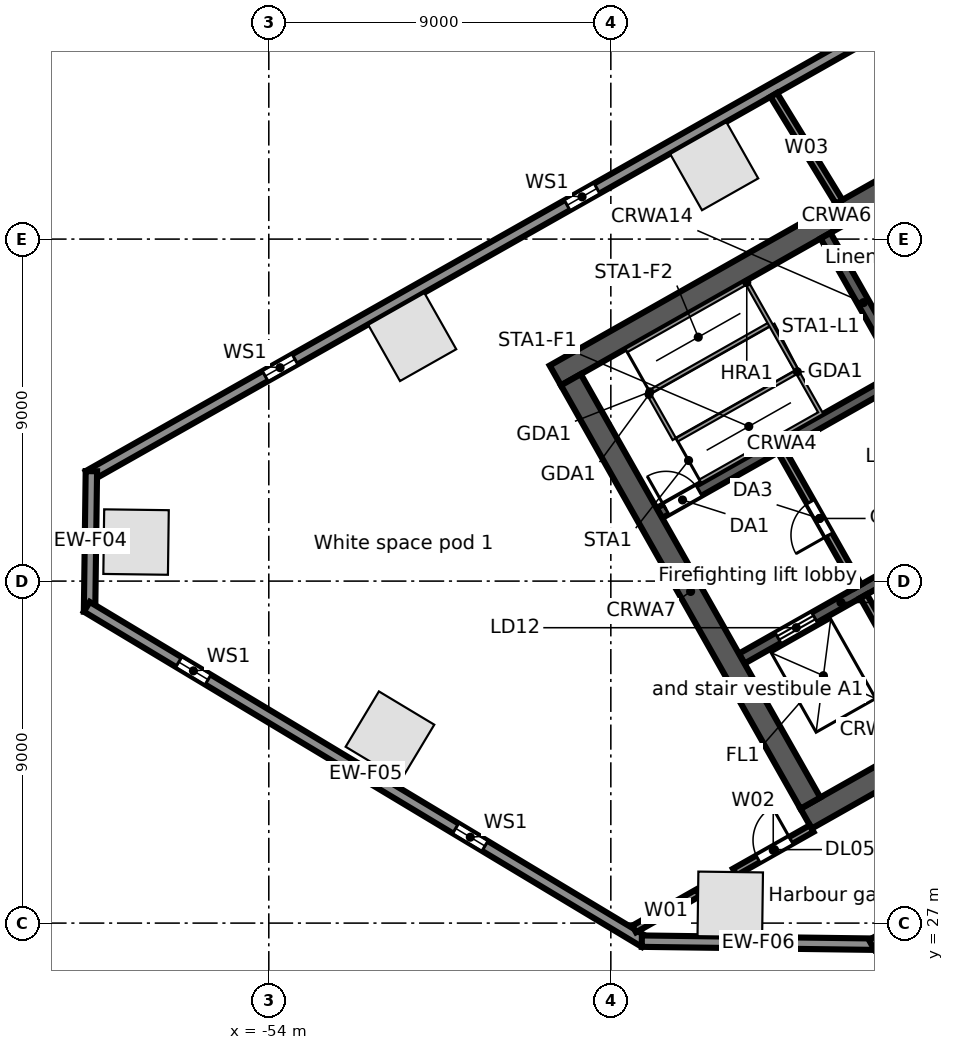
"""IFC4 building model, lengths in metres.
Left out: names, types, materials, properties, quantities, classifications, styles, units other than length and angle.
Written with IfcOpenShell. Run it as: python <this file> out.ifc"""

import sys

from ifc_helpers import new_model, si_unit, direction, frame, frame_2d, origin, origin_2d, place, context, subcontext, project, spatial, rectangle, extrude, element, fill, save


model = new_model("IFC4")
c1 = context("Model", 3, precision=1e-05, world=origin(), true_north=direction((0.0, 1.0)))
c2 = subcontext(c1, "Body", "Model", "MODEL_VIEW")
j1 = project(units=[si_unit("LENGTHUNIT", "METRE"), si_unit("PLANEANGLEUNIT", "RADIAN")], contexts=[c1])
p1 = place(None, origin())
s1 = spatial("IfcSite", under=j1, at=p1, CompositionType="ELEMENT")
p2 = place(p1, origin())
s2 = spatial("IfcBuilding", under=s1, at=p2, CompositionType="ELEMENT")
p3 = place(p2, frame((0.0, 0.0, 31.5)))
s3 = spatial("IfcBuildingStorey", under=s2, at=p3, CompositionType="ELEMENT", Elevation=31.5)
for number, where, z_axis, x_axis in (
    (1, (-42.28, 46.919, 0.0), (0.0, 0.0, 1.0), (-0.87, -0.492, 0.0)),
    (2, (-50.226, 42.423, 0.0), (0.0, 0.0, 1.0), (-0.87, -0.492, 0.0)),
    (3, (-57.493, 37.027, 0.0), (0.0, 0.0, 1.0), (-0.013, -1.0, 0.0)),
    (4, (-50.812, 31.931, 0.0), (0.0, 0.0, 1.0), (0.857, -0.515, 0.0)),
    (5, (-41.858, 27.495, 0.0), (0.0, 0.0, 1.0), (1.0, -0.013, 0.0)),
):
    element("IfcColumn", number, at=place(p3, frame(where, z_axis=z_axis, x_axis=x_axis)), inside=s3, PredefinedType="COLUMN", context=c2, shape_type="SweptSolid", body=[
        extrude(rectangle(XDim=1.7, YDim=1.7, at=origin_2d()), origin(), (0.0, 0.0, 1.0), 5.0),
    ])
p4 = place(p3, frame((-58.745, 38.764, 0.0), z_axis=(0.0, 0.0, 1.0), x_axis=(0.870355811726, 0.492423355453, 0.0)))
e6 = element("IfcWall", 6, at=p4, inside=s3, PredefinedType="STANDARD", context=c2, shape_type="SweptSolid", body=[
    extrude(rectangle(XDim=64.025, YDim=0.3, at=frame_2d((32.013, 0.0))), origin(), (0.0, 0.0, 1.0), 4.68),
])
p5 = place(p4, frame((60.122, 0.0, 0.6)))
e7 = element("IfcOpeningElement", 7, at=p5, cuts=e6, PredefinedType="OPENING", context=c2, shape_type="SweptSolid", body=[
    extrude(rectangle(XDim=0.9, YDim=3.2, at=frame_2d((0.45, 1.6))), frame((0.0, 0.16, 0.0), z_axis=(0.0, -1.0, 0.0), x_axis=(1.0, 0.0, 0.0)), (0.0, 0.0, 1.0), 0.32),
])
p6 = place(p4, frame((50.992, 0.0, 0.6)))
e8 = element("IfcOpeningElement", 8, at=p6, cuts=e6, PredefinedType="OPENING", context=c2, shape_type="SweptSolid", body=[
    extrude(rectangle(XDim=0.9, YDim=3.2, at=frame_2d((0.45, 1.6))), frame((0.0, 0.16, 0.0), z_axis=(0.0, -1.0, 0.0), x_axis=(1.0, 0.0, 0.0)), (0.0, 0.0, 1.0), 0.32),
])
p7 = place(p4, frame((41.862, 0.0, 0.6)))
e9 = element("IfcOpeningElement", 9, at=p7, cuts=e6, PredefinedType="OPENING", context=c2, shape_type="SweptSolid", body=[
    extrude(rectangle(XDim=0.9, YDim=3.2, at=frame_2d((0.45, 1.6))), frame((0.0, 0.16, 0.0), z_axis=(0.0, -1.0, 0.0), x_axis=(1.0, 0.0, 0.0)), (0.0, 0.0, 1.0), 0.32),
])
p8 = place(p4, frame((32.732, 0.0, 0.6)))
e10 = element("IfcOpeningElement", 10, at=p8, cuts=e6, PredefinedType="OPENING", context=c2, shape_type="SweptSolid", body=[
    extrude(rectangle(XDim=0.9, YDim=3.2, at=frame_2d((0.45, 1.6))), frame((0.0, 0.16, 0.0), z_axis=(0.0, -1.0, 0.0), x_axis=(1.0, 0.0, 0.0)), (0.0, 0.0, 1.0), 0.32),
])
p9 = place(p4, frame((23.602, 0.0, 0.6)))
e11 = element("IfcOpeningElement", 11, at=p9, cuts=e6, PredefinedType="OPENING", context=c2, shape_type="SweptSolid", body=[
    extrude(rectangle(XDim=0.9, YDim=3.2, at=frame_2d((0.45, 1.6))), frame((0.0, 0.16, 0.0), z_axis=(0.0, -1.0, 0.0), x_axis=(1.0, 0.0, 0.0)), (0.0, 0.0, 1.0), 0.32),
])
p10 = place(p4, frame((14.472, 0.0, 0.6)))
e12 = element("IfcOpeningElement", 12, at=p10, cuts=e6, PredefinedType="OPENING", context=c2, shape_type="SweptSolid", body=[
    extrude(rectangle(XDim=0.9, YDim=3.2, at=frame_2d((0.45, 1.6))), frame((0.0, 0.16, 0.0), z_axis=(0.0, -1.0, 0.0), x_axis=(1.0, 0.0, 0.0)), (0.0, 0.0, 1.0), 0.32),
])
p11 = place(p4, frame((5.342, 0.0, 0.6)))
e13 = element("IfcOpeningElement", 13, at=p11, cuts=e6, PredefinedType="OPENING", context=c2, shape_type="SweptSolid", body=[
    extrude(rectangle(XDim=0.9, YDim=3.2, at=frame_2d((0.45, 1.6))), frame((0.0, 0.16, 0.0), z_axis=(0.0, -1.0, 0.0), x_axis=(1.0, 0.0, 0.0)), (0.0, 0.0, 1.0), 0.32),
])
p12 = place(p3, frame((-58.717, 35.194, 0.0), z_axis=(0.0, 0.0, 1.0), x_axis=(0.013069053407, 0.999914596275, 0.0)))
e14 = element("IfcWall", 14, at=p12, inside=s3, PredefinedType="STANDARD", context=c2, shape_type="SweptSolid", body=[
    extrude(rectangle(XDim=3.699, YDim=0.3, at=frame_2d((1.849, 0.0))), origin(), (0.0, 0.0, 1.0), 4.68),
])
p13 = place(p3, frame((-44.109, 26.504, 0.0), z_axis=(0.0, 0.0, 1.0), x_axis=(-0.857169502585, 0.515034410344, 0.0)))
e15 = element("IfcWall", 15, at=p13, inside=s3, PredefinedType="STANDARD", context=c2, shape_type="SweptSolid", body=[
    extrude(rectangle(XDim=17.127, YDim=0.3, at=frame_2d((8.563, 0.0))), origin(), (0.0, 0.0, 1.0), 4.68),
])
p14 = place(p13, frame((13.403, 0.0, 0.6)))
e16 = element("IfcOpeningElement", 16, at=p14, cuts=e15, PredefinedType="OPENING", context=c2, shape_type="SweptSolid", body=[
    extrude(rectangle(XDim=0.9, YDim=3.2, at=frame_2d((0.45, 1.6))), frame((0.0, 0.16, 0.0), z_axis=(0.0, -1.0, 0.0), x_axis=(1.0, 0.0, 0.0)), (0.0, 0.0, 1.0), 0.32),
])
p15 = place(p13, frame((4.903, 0.0, 0.6)))
e17 = element("IfcOpeningElement", 17, at=p15, cuts=e15, PredefinedType="OPENING", context=c2, shape_type="SweptSolid", body=[
    extrude(rectangle(XDim=0.9, YDim=3.2, at=frame_2d((0.45, 1.6))), frame((0.0, 0.16, 0.0), z_axis=(0.0, -1.0, 0.0), x_axis=(1.0, 0.0, 0.0)), (0.0, 0.0, 1.0), 0.32),
])
p16 = place(p3, frame((-38.057, 26.445, 0.0), z_axis=(0.0, 0.0, 1.0), x_axis=(-0.999914086342, 0.013108010296, 0.0)))
e18 = element("IfcWall", 18, at=p16, inside=s3, PredefinedType="STANDARD", context=c2, shape_type="SweptSolid", body=[
    extrude(rectangle(XDim=6.128, YDim=0.3, at=frame_2d((3.064, 0.0))), origin(), (0.0, 0.0, 1.0), 4.68),
])
p17 = place(p3, frame((-0.055, 47.969, 0.0), z_axis=(0.0, 0.0, 1.0), x_axis=(-0.870355730478, -0.492423499058, 0.0)))
e19 = element("IfcWall", 19, at=p17, inside=s3, PredefinedType="STANDARD", context=c2, shape_type="SweptSolid", body=[
    extrude(rectangle(XDim=43.75, YDim=0.3, at=frame_2d((21.875, 0.0))), origin(), (0.0, 0.0, 1.0), 4.68),
])
p18 = place(p17, frame((39.977, 0.0, 0.6)))
e20 = element("IfcOpeningElement", 20, at=p18, cuts=e19, PredefinedType="OPENING", context=c2, shape_type="SweptSolid", body=[
    extrude(rectangle(XDim=0.9, YDim=3.2, at=frame_2d((0.45, 1.6))), frame((0.0, 0.16, 0.0), z_axis=(0.0, -1.0, 0.0), x_axis=(1.0, 0.0, 0.0)), (0.0, 0.0, 1.0), 0.32),
])
p19 = place(p17, frame((31.222, 0.0, 0.6)))
e21 = element("IfcOpeningElement", 21, at=p19, cuts=e19, PredefinedType="OPENING", context=c2, shape_type="SweptSolid", body=[
    extrude(rectangle(XDim=0.9, YDim=3.2, at=frame_2d((0.45, 1.6))), frame((0.0, 0.16, 0.0), z_axis=(0.0, -1.0, 0.0), x_axis=(1.0, 0.0, 0.0)), (0.0, 0.0, 1.0), 0.32),
])
p20 = place(p17, frame((22.468, 0.0, 0.6)))
e22 = element("IfcOpeningElement", 22, at=p20, cuts=e19, PredefinedType="OPENING", context=c2, shape_type="SweptSolid", body=[
    extrude(rectangle(XDim=0.9, YDim=3.2, at=frame_2d((0.45, 1.6))), frame((0.0, 0.16, 0.0), z_axis=(0.0, -1.0, 0.0), x_axis=(1.0, 0.0, 0.0)), (0.0, 0.0, 1.0), 0.32),
])
p21 = place(p17, frame((13.713, 0.0, 0.6)))
e23 = element("IfcOpeningElement", 23, at=p21, cuts=e19, PredefinedType="OPENING", context=c2, shape_type="SweptSolid", body=[
    extrude(rectangle(XDim=0.9, YDim=3.2, at=frame_2d((0.45, 1.6))), frame((0.0, 0.16, 0.0), z_axis=(0.0, -1.0, 0.0), x_axis=(1.0, 0.0, 0.0)), (0.0, 0.0, 1.0), 0.32),
])
p22 = place(p17, frame((4.959, 0.0, 0.6)))
e24 = element("IfcOpeningElement", 24, at=p22, cuts=e19, PredefinedType="OPENING", context=c2, shape_type="SweptSolid", body=[
    extrude(rectangle(XDim=0.9, YDim=3.2, at=frame_2d((0.45, 1.6))), frame((0.0, 0.16, 0.0), z_axis=(0.0, -1.0, 0.0), x_axis=(1.0, 0.0, 0.0)), (0.0, 0.0, 1.0), 0.32),
])
p23 = place(p3, frame((-39.862, 29.749, 0.0), z_axis=(0.0, 0.0, 1.0), x_axis=(0.870350116061, 0.492433422375, 0.0)))
e25 = element("IfcWall", 25, at=p23, inside=s3, PredefinedType="SOLIDWALL", context=c2, shape_type="SweptSolid", body=[
    extrude(rectangle(XDim=17.0, YDim=0.6, at=frame_2d((8.5, 0.0))), origin(), (0.0, 0.0, 1.0), 4.68),
])
p24 = place(p23, frame((7.2, 0.0, 0.0)))
e26 = element("IfcOpeningElement", 26, at=p24, cuts=e25, PredefinedType="OPENING", context=c2, shape_type="SweptSolid", body=[
    extrude(rectangle(XDim=1.2, YDim=2.1, at=frame_2d((0.6, 1.05))), frame((0.0, 0.31, 0.0), z_axis=(0.0, -1.0, 0.0), x_axis=(1.0, 0.0, 0.0)), (0.0, 0.0, 1.0), 0.62),
])
p25 = place(p3, frame((-41.556, 33.961, 0.0), z_axis=(0.0, 0.0, 1.0), x_axis=(0.870343731308, 0.492444706919, 0.0)))
e27 = element("IfcWall", 27, at=p25, inside=s3, PredefinedType="SOLIDWALL", context=c2, shape_type="SweptSolid", body=[
    extrude(rectangle(XDim=6.0, YDim=0.3, at=frame_2d((3.0, 0.0))), origin(), (0.0, 0.0, 1.0), 4.68),
])
p26 = place(p25, frame((1.1, 0.0, 0.0)))
e28 = element("IfcOpeningElement", 28, at=p26, cuts=e27, PredefinedType="OPENING", context=c2, shape_type="SweptSolid", body=[
    extrude(rectangle(XDim=1.1, YDim=2.1, at=frame_2d((0.55, 1.05))), frame((0.0, 0.16, 0.0), z_axis=(0.0, -1.0, 0.0), x_axis=(1.0, 0.0, 0.0)), (0.0, 0.0, 1.0), 0.32),
])
p27 = place(p25, frame((4.25, 0.0, 0.0)))
e29 = element("IfcOpeningElement", 29, at=p27, cuts=e27, PredefinedType="OPENING", context=c2, shape_type="SweptSolid", body=[
    extrude(rectangle(XDim=1.1, YDim=2.1, at=frame_2d((0.55, 1.05))), frame((0.0, 0.16, 0.0), z_axis=(0.0, -1.0, 0.0), x_axis=(1.0, 0.0, 0.0)), (0.0, 0.0, 1.0), 0.32),
])
p28 = place(p3, frame((-43.723, 37.791, 0.0), z_axis=(0.0, 0.0, 1.0), x_axis=(0.87035077051, 0.49243226567, 0.0)))
e30 = element("IfcWall", 30, at=p28, inside=s3, PredefinedType="SOLIDWALL", context=c2, shape_type="SweptSolid", body=[
    extrude(rectangle(XDim=7.4, YDim=0.3, at=frame_2d((3.7, 0.0))), origin(), (0.0, 0.0, 1.0), 4.68),
])
p29 = place(p28, frame((0.2, 0.0, 0.0)))
e31 = element("IfcOpeningElement", 31, at=p29, cuts=e30, PredefinedType="OPENING", context=c2, shape_type="SweptSolid", body=[
    extrude(rectangle(XDim=1.0, YDim=2.1, at=frame_2d((0.5, 1.05))), frame((0.0, 0.16, 0.0), z_axis=(0.0, -1.0, 0.0), x_axis=(1.0, 0.0, 0.0)), (0.0, 0.0, 1.0), 0.32),
])
p30 = place(p3, frame((-46.461, 41.412, 0.0), z_axis=(0.0, 0.0, 1.0), x_axis=(0.870350116061, 0.492433422375, 0.0)))
e32 = element("IfcWall", 32, at=p30, inside=s3, PredefinedType="SOLIDWALL", context=c2, shape_type="SweptSolid", body=[
    extrude(rectangle(XDim=17.0, YDim=0.6, at=frame_2d((8.5, 0.0))), origin(), (0.0, 0.0, 1.0), 4.68),
])
p31 = place(p3, frame((-46.052, 41.298, 0.0), z_axis=(0.0, 0.0, 1.0), x_axis=(0.492418598281, -0.870358503186, 0.0)))
e33 = element("IfcWall", 33, at=p31, inside=s3, PredefinedType="SOLIDWALL", context=c2, shape_type="SweptSolid", body=[
    extrude(rectangle(XDim=12.8, YDim=0.6, at=frame_2d((6.4, 0.0))), origin(), (0.0, 0.0, 1.0), 4.68),
])
p32 = place(p3, frame((-38.349, 35.603, 0.0), z_axis=(0.0, 0.0, 1.0), x_axis=(0.49241474071, -0.870360685654, 0.0)))
e34 = element("IfcWall", 34, at=p32, inside=s3, PredefinedType="SOLIDWALL", context=c2, shape_type="SweptSolid", body=[
    extrude(rectangle(XDim=4.05, YDim=0.2, at=frame_2d((2.025, 0.0))), origin(), (0.0, 0.0, 1.0), 4.68),
])
p33 = place(p3, frame((-40.516, 39.433, 0.0), z_axis=(0.0, 0.0, 1.0), x_axis=(0.492453559952, -0.87033872216, 0.0)))
e35 = element("IfcWall", 35, at=p33, inside=s3, PredefinedType="PARTITIONING", context=c2, shape_type="SweptSolid", body=[
    extrude(rectangle(XDim=4.1, YDim=0.2, at=frame_2d((2.05, 0.0))), origin(), (0.0, 0.0, 1.0), 4.68),
])
p34 = place(p33, frame((1.55, 0.0, 0.0)))
e36 = element("IfcOpeningElement", 36, at=p34, cuts=e35, PredefinedType="OPENING", context=c2, shape_type="SweptSolid", body=[
    extrude(rectangle(XDim=1.0, YDim=2.1, at=frame_2d((0.5, 1.05))), frame((0.0, 0.11, 0.0), z_axis=(0.0, -1.0, 0.0), x_axis=(1.0, 0.0, 0.0)), (0.0, 0.0, 1.0), 0.22),
])
p35 = place(p3, frame((-39.35, 45.09, 0.0), z_axis=(0.0, 0.0, 1.0), x_axis=(0.49241474071, -0.870360685654, 0.0)))
e37 = element("IfcWall", 37, at=p35, inside=s3, PredefinedType="SOLIDWALL", context=c2, shape_type="SweptSolid", body=[
    extrude(rectangle(XDim=4.05, YDim=0.3, at=frame_2d((2.025, 0.0))), origin(), (0.0, 0.0, 1.0), 4.68),
])
p36 = place(p3, frame((-44.386, 26.845, 0.0), z_axis=(0.0, 0.0, 1.0), x_axis=(0.870226201187, 0.492652371118, 0.0)))
e38 = element("IfcWall", 38, at=p36, inside=s3, PredefinedType="PARTITIONING", context=c2, shape_type="SweptSolid", body=[
    extrude(rectangle(XDim=1.933, YDim=0.2, at=frame_2d((0.966, 0.0))), origin(), (0.0, 0.0, 1.0), 4.68),
])
p37 = place(p3, frame((-41.738, 28.343, 0.0), z_axis=(0.0, 0.0, 1.0), x_axis=(0.870265350095, 0.492583211676, 0.0)))
e39 = element("IfcWall", 39, at=p37, inside=s3, PredefinedType="PARTITIONING", context=c2, shape_type="SweptSolid", body=[
    extrude(rectangle(XDim=2.324, YDim=0.2, at=frame_2d((1.162, 0.0))), origin(), (0.0, 0.0, 1.0), 4.68),
])
p38 = place(p37, frame((0.7, 0.0, 0.0)))
e40 = element("IfcOpeningElement", 40, at=p38, cuts=e39, PredefinedType="OPENING", context=c2, shape_type="SweptSolid", body=[
    extrude(rectangle(XDim=1.0, YDim=2.1, at=frame_2d((0.5, 1.05))), frame((0.0, 0.11, 0.0), z_axis=(0.0, -1.0, 0.0), x_axis=(1.0, 0.0, 0.0)), (0.0, 0.0, 1.0), 0.22),
])
p39 = place(p3, frame((-40.713, 48.794, 0.0), z_axis=(0.0, 0.0, 1.0), x_axis=(0.52165366254, -0.853157345604, 0.0)))
e41 = element("IfcWall", 41, at=p39, inside=s3, PredefinedType="PARTITIONING", context=c2, shape_type="SweptSolid", body=[
    extrude(rectangle(XDim=3.297, YDim=0.2, at=frame_2d((1.648, 0.0))), origin(), (0.0, 0.0, 1.0), 3.96),
])
p40 = place(p10, origin())
e42 = element("IfcWindow", 42, at=p40, inside=s3, PartitioningType="SINGLE_PANEL", PredefinedType="WINDOW", context=c2, shape_type="SweptSolid", body=[
    extrude(rectangle(XDim=0.9, YDim=3.2, at=frame_2d((0.45, 1.6))), frame((0.0, 0.03, 0.0), z_axis=(0.0, -1.0, 0.0), x_axis=(1.0, 0.0, 0.0)), (0.0, 0.0, 1.0), 0.06),
])
fill(e12, e42)
p41 = place(p11, origin())
e43 = element("IfcWindow", 43, at=p41, inside=s3, PartitioningType="SINGLE_PANEL", PredefinedType="WINDOW", context=c2, shape_type="SweptSolid", body=[
    extrude(rectangle(XDim=0.9, YDim=3.2, at=frame_2d((0.45, 1.6))), frame((0.0, 0.03, 0.0), z_axis=(0.0, -1.0, 0.0), x_axis=(1.0, 0.0, 0.0)), (0.0, 0.0, 1.0), 0.06),
])
fill(e13, e43)
p42 = place(p14, origin())
e44 = element("IfcWindow", 44, at=p42, inside=s3, PartitioningType="SINGLE_PANEL", PredefinedType="WINDOW", context=c2, shape_type="SweptSolid", body=[
    extrude(rectangle(XDim=0.9, YDim=3.2, at=frame_2d((0.45, 1.6))), frame((0.0, 0.03, 0.0), z_axis=(0.0, -1.0, 0.0), x_axis=(1.0, 0.0, 0.0)), (0.0, 0.0, 1.0), 0.06),
])
fill(e16, e44)
p43 = place(p15, origin())
e45 = element("IfcWindow", 45, at=p43, inside=s3, PartitioningType="SINGLE_PANEL", PredefinedType="WINDOW", context=c2, shape_type="SweptSolid", body=[
    extrude(rectangle(XDim=0.9, YDim=3.2, at=frame_2d((0.45, 1.6))), frame((0.0, 0.03, 0.0), z_axis=(0.0, -1.0, 0.0), x_axis=(1.0, 0.0, 0.0)), (0.0, 0.0, 1.0), 0.06),
])
fill(e17, e45)
p44 = place(p26, origin())
e46 = element("IfcDoor", 46, at=p44, inside=s3, OperationType="DOUBLE_DOOR_SLIDING", PredefinedType="DOOR", context=c2, shape_type="SweptSolid", body=[
    extrude(rectangle(XDim=1.1, YDim=2.1, at=frame_2d((0.55, 1.05))), frame((0.0, 0.025, 0.0), z_axis=(0.0, -1.0, 0.0), x_axis=(1.0, 0.0, 0.0)), (0.0, 0.0, 1.0), 0.05),
])
fill(e28, e46)
p45 = place(p29, origin())
e47 = element("IfcDoor", 47, at=p45, inside=s3, OperationType="SINGLE_SWING_LEFT", PredefinedType="DOOR", context=c2, shape_type="SweptSolid", body=[
    extrude(rectangle(XDim=1.0, YDim=2.1, at=frame_2d((0.5, 1.05))), frame((0.0, 0.025, 0.0), z_axis=(0.0, -1.0, 0.0), x_axis=(1.0, 0.0, 0.0)), (0.0, 0.0, 1.0), 0.05),
])
fill(e31, e47)
p46 = place(p34, frame((1.0, 0.0, 0.0), z_axis=(0.0, 0.0, 1.0), x_axis=(-1.0, 0.0, 0.0)))
e48 = element("IfcDoor", 48, at=p46, inside=s3, OperationType="SINGLE_SWING_LEFT", PredefinedType="DOOR", context=c2, shape_type="SweptSolid", body=[
    extrude(rectangle(XDim=1.0, YDim=2.1, at=frame_2d((0.5, 1.05))), frame((0.0, 0.025, 0.0), z_axis=(0.0, -1.0, 0.0), x_axis=(1.0, 0.0, 0.0)), (0.0, 0.0, 1.0), 0.05),
])
fill(e36, e48)
p47 = place(p38, origin())
e49 = element("IfcDoor", 49, at=p47, inside=s3, OperationType="SINGLE_SWING_RIGHT", PredefinedType="DOOR", context=c2, shape_type="SweptSolid", body=[
    extrude(rectangle(XDim=1.0, YDim=2.1, at=frame_2d((0.5, 1.05))), frame((0.0, 0.025, 0.0), z_axis=(0.0, -1.0, 0.0), x_axis=(1.0, 0.0, 0.0)), (0.0, 0.0, 1.0), 0.05),
])
fill(e40, e49)
save(model, sys.argv[1])
